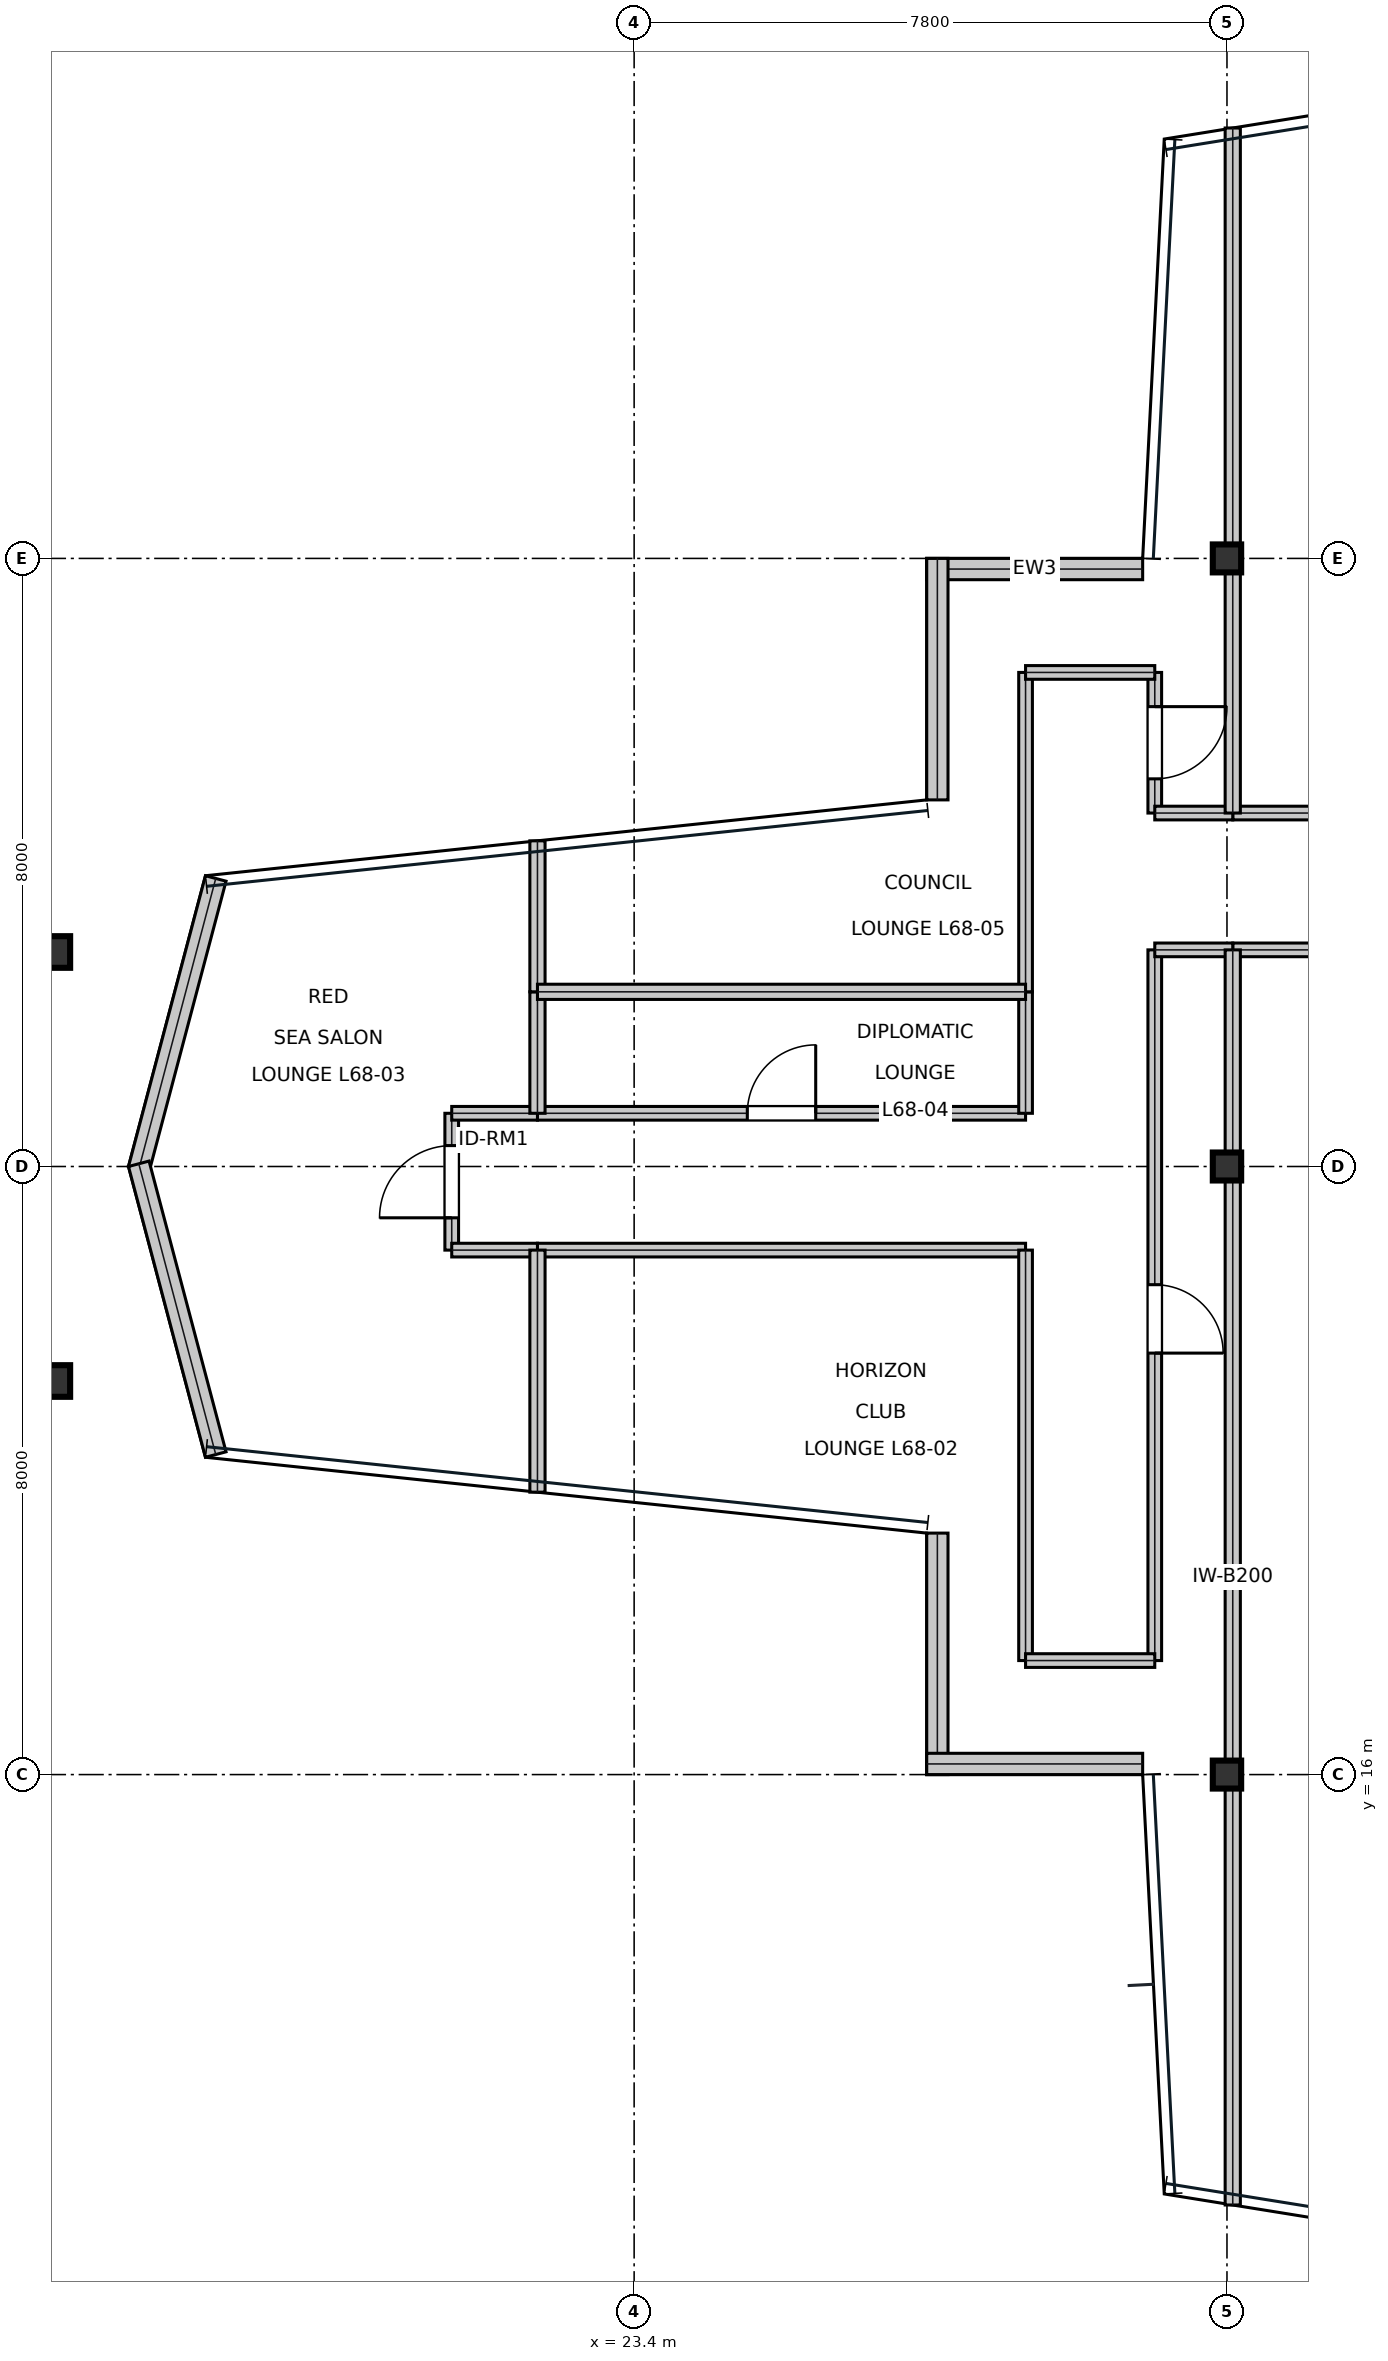
"""IFC4 building model, lengths in metres.
Left out: names, types, materials, properties, quantities, classifications, styles, units other than length and angle.
Written with IfcOpenShell. Run it as: python <this file> out.ifc"""

import sys

from ifc_helpers import new_model, si_unit, direction, frame, frame_2d, origin, origin_2d, place, context, subcontext, project, spatial, rectangle, i_section, extrude, element, fill, save


model = new_model("IFC4")
c1 = context("Model", 3, precision=1e-05, world=origin(), true_north=direction((0.0, 1.0)))
c2 = subcontext(c1, "Body", "Model", "MODEL_VIEW")
j1 = project(units=[si_unit("LENGTHUNIT", "METRE"), si_unit("PLANEANGLEUNIT", "RADIAN")], contexts=[c1])
p1 = place(None, origin())
s1 = spatial("IfcSite", under=j1, at=p1, CompositionType="ELEMENT")
p2 = place(p1, origin())
s2 = spatial("IfcBuilding", under=s1, at=p2, CompositionType="ELEMENT")
p3 = place(p2, frame((0.0, 0.0, 291.15)))
s3 = spatial("IfcBuildingStorey", under=s2, at=p3, CompositionType="ELEMENT", Elevation=291.15)
for number, where, z_axis, x_axis in (
    (1, (31.2, 16.0, 0.0), (0.0, 0.0, 1.0), (1.0, 0.0, 0.0)),
    (2, (31.2, 24.0, 0.0), (0.0, 0.0, 1.0), (1.0, 0.0, 0.0)),
    (3, (31.2, 32.0, 0.0), (0.0, 0.0, 1.0), (1.0, 0.0, 0.0)),
):
    element("IfcColumn", number, at=place(p3, frame(where, z_axis=z_axis, x_axis=x_axis)), inside=s3, PredefinedType="COLUMN", context=c2, shape_type="SweptSolid", body=[
        extrude(i_section(OverallWidth=0.373, OverallDepth=0.368, WebThickness=0.015, FlangeThickness=0.024, at=origin_2d()), origin(), (0.0, 0.0, 1.0), 4.044),
    ])
for number, where, z_axis, x_axis in (
    (4, (15.776, 21.178, 0.016), (0.0, 0.0, 1.0), (1.0, 0.0, 0.0)),
    (5, (15.776, 26.822, 0.016), (0.0, 0.0, 1.0), (1.0, 0.0, 0.0)),
):
    element("IfcColumn", number, at=place(p3, frame(where, z_axis=z_axis, x_axis=x_axis)), inside=s3, PredefinedType="COLUMN", context=c2, shape_type="SweptSolid", body=[
        extrude(i_section(OverallWidth=0.406, OverallDepth=0.416, WebThickness=0.03, FlangeThickness=0.048, at=origin_2d()), origin(), (0.0, 0.0, 1.0), 4.018),
    ])
p4 = place(p3, frame((30.091, 31.86, 0.0), z_axis=(0.0, 0.0, 1.0), x_axis=(-1.0, 0.0, 0.0)))
e6 = element("IfcWall", 6, at=p4, inside=s3, PredefinedType="STANDARD", context=c2, shape_type="SweptSolid", body=[
    extrude(rectangle(XDim=2.841, YDim=0.28, at=frame_2d((1.421, 0.0))), origin(), (0.0, 0.0, 1.0), 3.81),
])
p5 = place(p3, frame((27.39, 32.0, 0.0), z_axis=(0.0, 0.0, 1.0), x_axis=(0.0, -1.0, 0.0)))
e7 = element("IfcWall", 7, at=p5, inside=s3, PredefinedType="STANDARD", context=c2, shape_type="SweptSolid", body=[
    extrude(rectangle(XDim=3.177, YDim=0.28, at=frame_2d((1.588, 0.0))), origin(), (0.0, 0.0, 1.0), 3.339),
])
for number, where, z_axis, x_axis in (
    (8, (17.895, 27.79, 0.0), (0.0, 0.0, 1.0), (-0.256, -0.967, 0.0)),
    (9, (16.883, 24.036, 0.0), (0.0, 0.0, 1.0), (0.256, -0.967, 0.0)),
):
    element("IfcWall", number, at=place(p3, frame(where, z_axis=z_axis, x_axis=x_axis)), inside=s3, PredefinedType="STANDARD", context=c2, shape_type="SweptSolid", body=[
        extrude(rectangle(XDim=3.957, YDim=0.28, at=frame_2d((1.979, 0.0))), origin(), (0.0, 0.0, 1.0), 3.27),
    ])
p6 = place(p3, frame((27.39, 19.177, 0.0), z_axis=(0.0, 0.0, 1.0), x_axis=(0.0, -1.0, 0.0)))
e10 = element("IfcWall", 10, at=p6, inside=s3, PredefinedType="STANDARD", context=c2, shape_type="SweptSolid", body=[
    extrude(rectangle(XDim=3.177, YDim=0.28, at=frame_2d((1.588, 0.0))), origin(), (0.0, 0.0, 1.0), 3.339),
])
p7 = place(p3, frame((27.25, 16.14, 0.0), z_axis=(0.0, 0.0, 1.0), x_axis=(1.0, 0.0, 0.0)))
e11 = element("IfcWall", 11, at=p7, inside=s3, PredefinedType="STANDARD", context=c2, shape_type="SweptSolid", body=[
    extrude(rectangle(XDim=2.841, YDim=0.28, at=frame_2d((1.421, 0.0))), origin(), (0.0, 0.0, 1.0), 3.81),
])
p8 = place(p3, frame((30.25, 17.5, 0.0), z_axis=(0.0, 0.0, 1.0), x_axis=(0.0, 1.0, 0.0)))
e12 = element("IfcWall", 12, at=p8, inside=s3, PredefinedType="SOLIDWALL", context=c2, shape_type="SweptSolid", body=[
    extrude(rectangle(XDim=9.35, YDim=0.18, at=frame_2d((4.675, 0.0))), origin(), (0.0, 0.0, 1.0), 3.27),
])
p9 = place(p8, frame((4.045, 0.0, 0.0)))
e13 = element("IfcOpeningElement", 13, at=p9, cuts=e12, PredefinedType="OPENING", context=c2, shape_type="SweptSolid", body=[
    extrude(rectangle(XDim=0.9, YDim=2.15, at=frame_2d((0.45, 1.075))), frame((0.0, 0.1, 0.0), z_axis=(0.0, -1.0, 0.0), x_axis=(1.0, 0.0, 0.0)), (0.0, 0.0, 1.0), 0.2),
])
p10 = place(p3, frame((21.0, 22.9, 0.0), z_axis=(0.0, 0.0, 1.0), x_axis=(0.0, 1.0, 0.0)))
e14 = element("IfcWall", 14, at=p10, inside=s3, PredefinedType="SOLIDWALL", context=c2, shape_type="SweptSolid", body=[
    extrude(rectangle(XDim=1.8, YDim=0.18, at=frame_2d((0.9, 0.0))), origin(), (0.0, 0.0, 1.0), 3.81),
])
p11 = place(p10, frame((0.425, 0.0, 0.0)))
e15 = element("IfcOpeningElement", 15, at=p11, cuts=e14, PredefinedType="OPENING", context=c2, shape_type="SweptSolid", body=[
    extrude(rectangle(XDim=0.95, YDim=2.15, at=frame_2d((0.475, 1.075))), frame((0.0, 0.1, 0.0), z_axis=(0.0, -1.0, 0.0), x_axis=(1.0, 0.0, 0.0)), (0.0, 0.0, 1.0), 0.2),
])
p12 = place(p3, frame((22.128, 24.7, 0.0), z_axis=(0.0, 0.0, 1.0), x_axis=(1.0, 0.0, 0.0)))
e16 = element("IfcWall", 16, at=p12, inside=s3, PredefinedType="SOLIDWALL", context=c2, shape_type="SweptSolid", body=[
    extrude(rectangle(XDim=6.422, YDim=0.18, at=frame_2d((3.211, 0.0))), origin(), (0.0, 0.0, 1.0), 3.27),
])
p13 = place(p12, frame((2.761, 0.0, 0.0)))
e17 = element("IfcOpeningElement", 17, at=p13, cuts=e16, PredefinedType="OPENING", context=c2, shape_type="SweptSolid", body=[
    extrude(rectangle(XDim=0.9, YDim=2.15, at=frame_2d((0.45, 1.075))), frame((0.0, 0.1, 0.0), z_axis=(0.0, -1.0, 0.0), x_axis=(1.0, 0.0, 0.0)), (0.0, 0.0, 1.0), 0.2),
])
p14 = place(p3, frame((30.25, 28.65, 0.0), z_axis=(0.0, 0.0, 1.0), x_axis=(0.0, 1.0, 0.0)))
e18 = element("IfcWall", 18, at=p14, inside=s3, PredefinedType="SOLIDWALL", context=c2, shape_type="SweptSolid", body=[
    extrude(rectangle(XDim=1.85, YDim=0.18, at=frame_2d((0.925, 0.0))), origin(), (0.0, 0.0, 1.0), 3.81),
])
p15 = place(p14, frame((0.45, 0.0, 0.0)))
e19 = element("IfcOpeningElement", 19, at=p15, cuts=e18, PredefinedType="OPENING", context=c2, shape_type="SweptSolid", body=[
    extrude(rectangle(XDim=0.95, YDim=2.15, at=frame_2d((0.475, 1.075))), frame((0.0, 0.1, 0.0), z_axis=(0.0, -1.0, 0.0), x_axis=(1.0, 0.0, 0.0)), (0.0, 0.0, 1.0), 0.2),
])
p16 = place(p3, frame((31.276, 28.65, 0.0), z_axis=(0.0, 0.0, 1.0), x_axis=(1.0, 0.0, 0.0)))
e20 = element("IfcWall", 20, at=p16, inside=s3, PredefinedType="SOLIDWALL", context=c2, shape_type="SweptSolid", body=[
    extrude(rectangle(XDim=5.774, YDim=0.18, at=frame_2d((2.887, 0.0))), origin(), (0.0, 0.0, 1.0), 3.81),
])
p17 = place(p16, frame((2.437, 0.0, 0.0)))
e21 = element("IfcOpeningElement", 21, at=p17, cuts=e20, PredefinedType="OPENING", context=c2, shape_type="SweptSolid", body=[
    extrude(rectangle(XDim=0.9, YDim=2.15, at=frame_2d((0.45, 1.075))), frame((0.0, 0.1, 0.0), z_axis=(0.0, -1.0, 0.0), x_axis=(1.0, 0.0, 0.0)), (0.0, 0.0, 1.0), 0.2),
])
p18 = place(p3, frame((31.276, 26.85, 0.0), z_axis=(0.0, 0.0, 1.0), x_axis=(1.0, 0.0, 0.0)))
e22 = element("IfcWall", 22, at=p18, inside=s3, PredefinedType="SOLIDWALL", context=c2, shape_type="SweptSolid", body=[
    extrude(rectangle(XDim=4.874, YDim=0.18, at=frame_2d((2.437, 0.0))), origin(), (0.0, 0.0, 1.0), 3.81),
])
p19 = place(p3, frame((22.128, 22.9, 0.0), z_axis=(0.0, 0.0, 1.0), x_axis=(1.0, 0.0, 0.0)))
e23 = element("IfcWall", 23, at=p19, inside=s3, PredefinedType="SOLIDWALL", context=c2, shape_type="SweptSolid", body=[
    extrude(rectangle(XDim=6.422, YDim=0.18, at=frame_2d((3.211, 0.0))), origin(), (0.0, 0.0, 1.0), 3.27),
])
p20 = place(p3, frame((28.55, 17.5, 0.0), z_axis=(0.0, 0.0, 1.0), x_axis=(0.0, 1.0, 0.0)))
e24 = element("IfcWall", 24, at=p20, inside=s3, PredefinedType="SOLIDWALL", context=c2, shape_type="SweptSolid", body=[
    extrude(rectangle(XDim=5.4, YDim=0.18, at=frame_2d((2.7, 0.0))), origin(), (0.0, 0.0, 1.0), 3.81),
])
p21 = place(p3, frame((28.55, 17.5, 0.0), z_axis=(0.0, 0.0, 1.0), x_axis=(1.0, 0.0, 0.0)))
e25 = element("IfcWall", 25, at=p21, inside=s3, PredefinedType="SOLIDWALL", context=c2, shape_type="SweptSolid", body=[
    extrude(rectangle(XDim=1.7, YDim=0.18, at=frame_2d((0.85, 0.0))), origin(), (0.0, 0.0, 1.0), 3.81),
])
p22 = place(p3, frame((30.25, 26.85, 0.0), z_axis=(0.0, 0.0, 1.0), x_axis=(1.0, 0.0, 0.0)))
e26 = element("IfcWall", 26, at=p22, inside=s3, PredefinedType="SOLIDWALL", context=c2, shape_type="SweptSolid", body=[
    extrude(rectangle(XDim=1.026, YDim=0.18, at=frame_2d((0.513, 0.0))), origin(), (0.0, 0.0, 1.0), 3.27),
])
for number, where, z_axis, x_axis in (
    (27, (21.0, 22.9, 0.0), (0.0, 0.0, 1.0), (1.0, 0.0, 0.0)),
    (28, (21.0, 24.7, 0.0), (0.0, 0.0, 1.0), (1.0, 0.0, 0.0)),
):
    element("IfcWall", number, at=place(p3, frame(where, z_axis=z_axis, x_axis=x_axis)), inside=s3, PredefinedType="SOLIDWALL", context=c2, shape_type="SweptSolid", body=[
        extrude(rectangle(XDim=1.128, YDim=0.18, at=frame_2d((0.564, 0.0))), origin(), (0.0, 0.0, 1.0), 3.54),
    ])
p23 = place(p3, frame((28.55, 24.7, 0.0), z_axis=(0.0, 0.0, 1.0), x_axis=(0.0, 1.0, 0.0)))
e29 = element("IfcWall", 29, at=p23, inside=s3, PredefinedType="SOLIDWALL", context=c2, shape_type="SweptSolid", body=[
    extrude(rectangle(XDim=1.598, YDim=0.18, at=frame_2d((0.799, 0.0))), origin(), (0.0, 0.0, 1.0), 3.81),
])
p24 = place(p3, frame((28.55, 26.298, 0.0), z_axis=(0.0, 0.0, 1.0), x_axis=(0.0, 1.0, 0.0)))
e30 = element("IfcWall", 30, at=p24, inside=s3, PredefinedType="SOLIDWALL", context=c2, shape_type="SweptSolid", body=[
    extrude(rectangle(XDim=4.202, YDim=0.18, at=frame_2d((2.101, 0.0))), origin(), (0.0, 0.0, 1.0), 3.81),
])
p25 = place(p3, frame((28.55, 30.5, 0.0), z_axis=(0.0, 0.0, 1.0), x_axis=(1.0, 0.0, 0.0)))
e31 = element("IfcWall", 31, at=p25, inside=s3, PredefinedType="SOLIDWALL", context=c2, shape_type="SweptSolid", body=[
    extrude(rectangle(XDim=1.7, YDim=0.18, at=frame_2d((0.85, 0.0))), origin(), (0.0, 0.0, 1.0), 3.81),
])
p26 = place(p3, frame((30.25, 28.65, 0.0), z_axis=(0.0, 0.0, 1.0), x_axis=(1.0, 0.0, 0.0)))
e32 = element("IfcWall", 32, at=p26, inside=s3, PredefinedType="SOLIDWALL", context=c2, shape_type="SweptSolid", body=[
    extrude(rectangle(XDim=1.026, YDim=0.18, at=frame_2d((0.513, 0.0))), origin(), (0.0, 0.0, 1.0), 3.27),
])
p27 = place(p3, frame((31.276, 10.337, 0.0), z_axis=(0.0, 0.0, 1.0), x_axis=(0.0, 1.0, 0.0)))
e33 = element("IfcWall", 33, at=p27, inside=s3, PredefinedType="SOLIDWALL", context=c2, shape_type="SweptSolid", body=[
    extrude(rectangle(XDim=16.513, YDim=0.2, at=frame_2d((8.256, 0.0))), origin(), (0.0, 0.0, 1.0), 3.27),
])
p28 = place(p3, frame((22.128, 19.715, 0.0), z_axis=(0.0, 0.0, 1.0), x_axis=(0.0, 1.0, 0.0)))
e34 = element("IfcWall", 34, at=p28, inside=s3, PredefinedType="SOLIDWALL", context=c2, shape_type="SweptSolid", body=[
    extrude(rectangle(XDim=3.185, YDim=0.2, at=frame_2d((1.592, 0.0))), origin(), (0.0, 0.0, 1.0), 3.27),
])
p29 = place(p3, frame((22.128, 24.7, 0.0), z_axis=(0.0, 0.0, 1.0), x_axis=(0.0, 1.0, 0.0)))
e35 = element("IfcWall", 35, at=p29, inside=s3, PredefinedType="SOLIDWALL", context=c2, shape_type="SweptSolid", body=[
    extrude(rectangle(XDim=1.598, YDim=0.2, at=frame_2d((0.799, 0.0))), origin(), (0.0, 0.0, 1.0), 3.27),
])
p30 = place(p3, frame((22.128, 26.298, 0.0), z_axis=(0.0, 0.0, 1.0), x_axis=(0.0, 1.0, 0.0)))
e36 = element("IfcWall", 36, at=p30, inside=s3, PredefinedType="SOLIDWALL", context=c2, shape_type="SweptSolid", body=[
    extrude(rectangle(XDim=1.987, YDim=0.2, at=frame_2d((0.993, 0.0))), origin(), (0.0, 0.0, 1.0), 3.81),
])
p31 = place(p3, frame((22.128, 26.298, 0.0), z_axis=(0.0, 0.0, 1.0), x_axis=(1.0, 0.0, 0.0)))
e37 = element("IfcWall", 37, at=p31, inside=s3, PredefinedType="SOLIDWALL", context=c2, shape_type="SweptSolid", body=[
    extrude(rectangle(XDim=6.422, YDim=0.2, at=frame_2d((3.211, 0.0))), origin(), (0.0, 0.0, 1.0), 3.54),
])
p32 = place(p3, frame((31.276, 28.65, 0.0), z_axis=(0.0, 0.0, 1.0), x_axis=(0.0, 1.0, 0.0)))
e38 = element("IfcWall", 38, at=p32, inside=s3, PredefinedType="SOLIDWALL", context=c2, shape_type="SweptSolid", body=[
    extrude(rectangle(XDim=9.013, YDim=0.2, at=frame_2d((4.506, 0.0))), origin(), (0.0, 0.0, 1.0), 3.27),
])
p33 = place(p9, frame((0.9, 0.0, 0.0), z_axis=(0.0, 0.0, 1.0), x_axis=(-1.0, 0.0, 0.0)))
e39 = element("IfcDoor", 39, at=p33, inside=s3, OperationType="SINGLE_SWING_RIGHT", PredefinedType="DOOR", context=c2, shape_type="SweptSolid", body=[
    extrude(rectangle(XDim=0.9, YDim=2.15, at=frame_2d((0.45, 1.075))), frame((0.0, 0.025, 0.0), z_axis=(0.0, -1.0, 0.0), x_axis=(1.0, 0.0, 0.0)), (0.0, 0.0, 1.0), 0.05),
])
fill(e13, e39)
p34 = place(p11, origin())
e40 = element("IfcDoor", 40, at=p34, inside=s3, OperationType="SINGLE_SWING_LEFT", PredefinedType="DOOR", context=c2, shape_type="SweptSolid", body=[
    extrude(rectangle(XDim=0.95, YDim=2.15, at=frame_2d((0.475, 1.075))), frame((0.0, 0.025, 0.0), z_axis=(0.0, -1.0, 0.0), x_axis=(1.0, 0.0, 0.0)), (0.0, 0.0, 1.0), 0.05),
])
fill(e15, e40)
p35 = place(p13, origin())
e41 = element("IfcDoor", 41, at=p35, inside=s3, OperationType="SINGLE_SWING_RIGHT", PredefinedType="DOOR", context=c2, shape_type="SweptSolid", body=[
    extrude(rectangle(XDim=0.9, YDim=2.15, at=frame_2d((0.45, 1.075))), frame((0.0, 0.025, 0.0), z_axis=(0.0, -1.0, 0.0), x_axis=(1.0, 0.0, 0.0)), (0.0, 0.0, 1.0), 0.05),
])
fill(e17, e41)
p36 = place(p15, frame((0.95, 0.0, 0.0), z_axis=(0.0, 0.0, 1.0), x_axis=(-1.0, 0.0, 0.0)))
e42 = element("IfcDoor", 42, at=p36, inside=s3, OperationType="SINGLE_SWING_LEFT", PredefinedType="DOOR", context=c2, shape_type="SweptSolid", body=[
    extrude(rectangle(XDim=0.95, YDim=2.15, at=frame_2d((0.475, 1.075))), frame((0.0, 0.025, 0.0), z_axis=(0.0, -1.0, 0.0), x_axis=(1.0, 0.0, 0.0)), (0.0, 0.0, 1.0), 0.05),
])
fill(e19, e42)
save(model, sys.argv[1])
